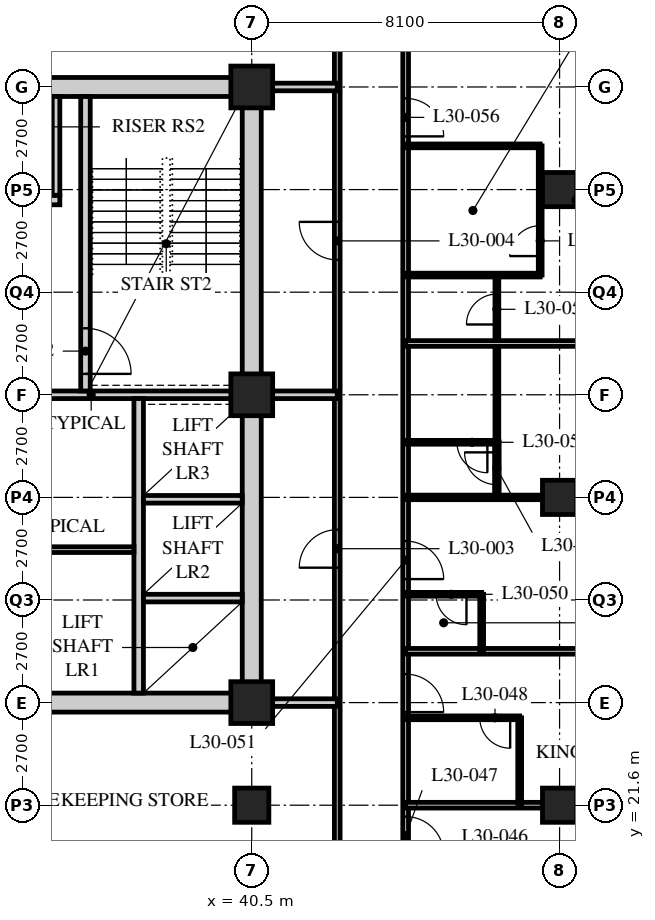
"""IFC4 building model, lengths in metres.
Left out: names, types, materials, properties, quantities, classifications, styles, units other than length and angle.
Written with IfcOpenShell. Run it as: python <this file> out.ifc"""

import sys

from ifc_helpers import new_model, si_unit, direction, frame, frame_2d, origin, origin_2d, place, context, subcontext, project, spatial, rectangle, hollow_rectangle, extrude, element, fill, save


model = new_model("IFC4")
c1 = context("Model", 3, precision=1e-05, world=origin(), true_north=direction((0.0, 1.0)))
c2 = subcontext(c1, "Body", "Model", "MODEL_VIEW")
j1 = project(units=[si_unit("LENGTHUNIT", "METRE"), si_unit("PLANEANGLEUNIT", "RADIAN")], contexts=[c1])
p1 = place(None, origin())
s1 = spatial("IfcSite", under=j1, at=p1, CompositionType="ELEMENT")
p2 = place(p1, origin())
s2 = spatial("IfcBuilding", under=s1, at=p2, CompositionType="ELEMENT")
p3 = place(p2, frame((0.0, 0.0, 120.4)))
s3 = spatial("IfcBuildingStorey", under=s2, at=p3, CompositionType="ELEMENT", Elevation=120.4)
p4 = place(p3, frame((40.5, 21.6, 0.0), z_axis=(0.0, 0.0, 1.0), x_axis=(1.0, 0.0, 0.0)))
e1 = element("IfcColumn", 1, at=p4, inside=s3, PredefinedType="COLUMN", context=c2, shape_type="SweptSolid", body=[
    extrude(hollow_rectangle(XDim=0.9, YDim=0.9, WallThickness=0.09, at=origin_2d()), origin(), (0.0, 0.0, 1.0), 3.4),
])
for number, where, z_axis, x_axis in (
    (2, (40.5, 24.3, 0.0), (0.0, 0.0, 1.0), (1.0, 0.0, 0.0)),
    (3, (40.5, 32.4, 0.0), (0.0, 0.0, 1.0), (1.0, 0.0, 0.0)),
    (4, (40.5, 40.5, 0.0), (0.0, 0.0, 1.0), (1.0, 0.0, 0.0)),
):
    element("IfcColumn", number, at=place(p3, frame(where, z_axis=z_axis, x_axis=x_axis)), inside=s3, PredefinedType="COLUMN", context=c2, shape_type="SweptSolid", body=[
        extrude(hollow_rectangle(XDim=1.1, YDim=1.1, WallThickness=0.1, at=origin_2d()), origin(), (0.0, 0.0, 1.0), 3.4),
    ])
for number, where, z_axis, x_axis in (
    (5, (48.6, 21.6, 0.0), (0.0, 0.0, 1.0), (1.0, 0.0, 0.0)),
    (6, (48.6, 29.7, 0.0), (0.0, 0.0, 1.0), (1.0, 0.0, 0.0)),
    (7, (48.6, 37.8, 0.0), (0.0, 0.0, 1.0), (1.0, 0.0, 0.0)),
):
    element("IfcColumn", number, at=place(p3, frame(where, z_axis=z_axis, x_axis=x_axis)), inside=s3, PredefinedType="COLUMN", context=c2, shape_type="SweptSolid", body=[
        extrude(hollow_rectangle(XDim=0.9, YDim=0.9, WallThickness=0.09, at=origin_2d()), origin(), (0.0, 0.0, 1.0), 3.4),
    ])
p5 = place(p3, frame((44.55, 17.55, 0.0), z_axis=(0.0, 0.0, 1.0), x_axis=(0.0, 1.0, 0.0)))
e8 = element("IfcWall", 8, at=p5, inside=s3, PredefinedType="PARTITIONING", context=c2, shape_type="SweptSolid", body=[
    extrude(rectangle(XDim=28.35, YDim=0.15, at=frame_2d((14.175, 0.0))), origin(), (0.0, 0.0, 1.0), 3.19),
])
p6 = place(p5, frame((2.75, 0.0, 0.0)))
e9 = element("IfcOpeningElement", 9, at=p6, cuts=e8, PredefinedType="OPENING", context=c2, shape_type="SweptSolid", body=[
    extrude(rectangle(XDim=1.0, YDim=2.1, at=frame_2d((0.5, 1.05))), frame((0.0, 0.085, 0.0), z_axis=(0.0, -1.0, 0.0), x_axis=(1.0, 0.0, 0.0)), (0.0, 0.0, 1.0), 0.17),
])
p7 = place(p5, frame((6.5, 0.0, 0.0)))
e10 = element("IfcOpeningElement", 10, at=p7, cuts=e8, PredefinedType="OPENING", context=c2, shape_type="SweptSolid", body=[
    extrude(rectangle(XDim=1.0, YDim=2.1, at=frame_2d((0.5, 1.05))), frame((0.0, 0.085, 0.0), z_axis=(0.0, -1.0, 0.0), x_axis=(1.0, 0.0, 0.0)), (0.0, 0.0, 1.0), 0.17),
])
p8 = place(p5, frame((10.0, 0.0, 0.0)))
e11 = element("IfcOpeningElement", 11, at=p8, cuts=e8, PredefinedType="OPENING", context=c2, shape_type="SweptSolid", body=[
    extrude(rectangle(XDim=1.0, YDim=2.1, at=frame_2d((0.5, 1.05))), frame((0.0, 0.085, 0.0), z_axis=(0.0, -1.0, 0.0), x_axis=(1.0, 0.0, 0.0)), (0.0, 0.0, 1.0), 0.17),
])
p9 = place(p5, frame((21.65, 0.0, 0.0)))
e12 = element("IfcOpeningElement", 12, at=p9, cuts=e8, PredefinedType="OPENING", context=c2, shape_type="SweptSolid", body=[
    extrude(rectangle(XDim=1.0, YDim=2.1, at=frame_2d((0.5, 1.05))), frame((0.0, 0.085, 0.0), z_axis=(0.0, -1.0, 0.0), x_axis=(1.0, 0.0, 0.0)), (0.0, 0.0, 1.0), 0.17),
])
p10 = place(p5, frame((26.75, 0.0, 0.0)))
e13 = element("IfcOpeningElement", 13, at=p10, cuts=e8, PredefinedType="OPENING", context=c2, shape_type="SweptSolid", body=[
    extrude(rectangle(XDim=1.0, YDim=2.1, at=frame_2d((0.5, 1.05))), frame((0.0, 0.085, 0.0), z_axis=(0.0, -1.0, 0.0), x_axis=(1.0, 0.0, 0.0)), (0.0, 0.0, 1.0), 0.17),
])
p11 = place(p3, frame((42.75, 19.35, 0.0), z_axis=(0.0, 0.0, 1.0), x_axis=(0.0, 1.0, 0.0)))
e14 = element("IfcWall", 14, at=p11, inside=s3, PredefinedType="PARTITIONING", context=c2, shape_type="SweptSolid", body=[
    extrude(rectangle(XDim=24.75, YDim=0.15, at=frame_2d((12.375, 0.0))), origin(), (0.0, 0.0, 1.0), 3.19),
])
p12 = place(p11, frame((8.5, 0.0, 0.0)))
e15 = element("IfcOpeningElement", 15, at=p12, cuts=e14, PredefinedType="OPENING", context=c2, shape_type="SweptSolid", body=[
    extrude(rectangle(XDim=1.0, YDim=2.1, at=frame_2d((0.5, 1.05))), frame((0.0, 0.085, 0.0), z_axis=(0.0, -1.0, 0.0), x_axis=(1.0, 0.0, 0.0)), (0.0, 0.0, 1.0), 0.17),
])
p13 = place(p11, frame((16.6, 0.0, 0.0)))
e16 = element("IfcOpeningElement", 16, at=p13, cuts=e14, PredefinedType="OPENING", context=c2, shape_type="SweptSolid", body=[
    extrude(rectangle(XDim=1.0, YDim=2.1, at=frame_2d((0.5, 1.05))), frame((0.0, 0.085, 0.0), z_axis=(0.0, -1.0, 0.0), x_axis=(1.0, 0.0, 0.0)), (0.0, 0.0, 1.0), 0.17),
])
for number, where, z_axis, x_axis in (
    (17, (40.5, 32.4, 0.0), (0.0, 0.0, 1.0), (1.0, 0.0, 0.0)),
    (18, (40.5, 24.3, 0.0), (0.0, 0.0, 1.0), (1.0, 0.0, 0.0)),
    (19, (40.5, 40.5, 0.0), (0.0, 0.0, 1.0), (1.0, 0.0, 0.0)),
):
    element("IfcWall", number, at=place(p3, frame(where, z_axis=z_axis, x_axis=x_axis)), inside=s3, PredefinedType="SOLIDWALL", context=c2, shape_type="SweptSolid", body=[
        extrude(rectangle(XDim=2.25, YDim=0.2, at=frame_2d((1.125, 0.0))), origin(), (0.0, 0.0, 1.0), 3.19),
    ])
p14 = place(p3, frame((44.55, 21.6, 0.0), z_axis=(0.0, 0.0, 1.0), x_axis=(1.0, 0.0, 0.0)))
e20 = element("IfcWall", 20, at=p14, inside=s3, PredefinedType="PARTITIONING", context=c2, shape_type="SweptSolid", body=[
    extrude(rectangle(XDim=11.85, YDim=0.15, at=frame_2d((5.925, 0.0))), origin(), (0.0, 0.0, 1.0), 2.578),
])
p15 = place(p3, frame((47.55, 21.6, 0.0), z_axis=(0.0, 0.0, 1.0), x_axis=(0.0, 1.0, 0.0)))
e21 = element("IfcWall", 21, at=p15, inside=s3, PredefinedType="PARTITIONING", context=c2, shape_type="SweptSolid", body=[
    extrude(rectangle(XDim=2.3, YDim=0.1, at=frame_2d((1.15, 0.0))), origin(), (0.0, 0.0, 1.0), 3.19),
])
p16 = place(p3, frame((44.55, 23.9, 0.0), z_axis=(0.0, 0.0, 1.0), x_axis=(1.0, 0.0, 0.0)))
e22 = element("IfcWall", 22, at=p16, inside=s3, PredefinedType="PARTITIONING", context=c2, shape_type="SweptSolid", body=[
    extrude(rectangle(XDim=3.0, YDim=0.1, at=frame_2d((1.5, 0.0))), origin(), (0.0, 0.0, 1.0), 3.19),
])
p17 = place(p16, frame((1.95, 0.0, 0.0)))
e23 = element("IfcOpeningElement", 23, at=p17, cuts=e22, PredefinedType="OPENING", context=c2, shape_type="SweptSolid", body=[
    extrude(rectangle(XDim=0.8, YDim=2.1, at=frame_2d((0.4, 1.05))), frame((0.0, 0.06, 0.0), z_axis=(0.0, -1.0, 0.0), x_axis=(1.0, 0.0, 0.0)), (0.0, 0.0, 1.0), 0.12),
])
p18 = place(p3, frame((44.55, 25.65, 0.0), z_axis=(0.0, 0.0, 1.0), x_axis=(1.0, 0.0, 0.0)))
e24 = element("IfcWall", 24, at=p18, inside=s3, PredefinedType="PARTITIONING", context=c2, shape_type="SweptSolid", body=[
    extrude(rectangle(XDim=11.85, YDim=0.15, at=frame_2d((5.925, 0.0))), origin(), (0.0, 0.0, 1.0), 3.19),
])
p19 = place(p3, frame((46.55, 25.65, 0.0), z_axis=(0.0, 0.0, 1.0), x_axis=(0.0, 1.0, 0.0)))
e25 = element("IfcWall", 25, at=p19, inside=s3, PredefinedType="PARTITIONING", context=c2, shape_type="SweptSolid", body=[
    extrude(rectangle(XDim=1.5, YDim=0.1, at=frame_2d((0.75, 0.0))), origin(), (0.0, 0.0, 1.0), 3.19),
])
p20 = place(p3, frame((44.55, 27.15, 0.0), z_axis=(0.0, 0.0, 1.0), x_axis=(1.0, 0.0, 0.0)))
e26 = element("IfcWall", 26, at=p20, inside=s3, PredefinedType="PARTITIONING", context=c2, shape_type="SweptSolid", body=[
    extrude(rectangle(XDim=2.0, YDim=0.1, at=frame_2d((1.0, 0.0))), origin(), (0.0, 0.0, 1.0), 3.19),
])
p21 = place(p20, frame((0.8, 0.0, 0.0)))
e27 = element("IfcOpeningElement", 27, at=p21, cuts=e26, PredefinedType="OPENING", context=c2, shape_type="SweptSolid", body=[
    extrude(rectangle(XDim=0.8, YDim=2.1, at=frame_2d((0.4, 1.05))), frame((0.0, 0.06, 0.0), z_axis=(0.0, -1.0, 0.0), x_axis=(1.0, 0.0, 0.0)), (0.0, 0.0, 1.0), 0.12),
])
p22 = place(p3, frame((46.95, 31.15, 0.0), z_axis=(0.0, 0.0, 1.0), x_axis=(0.0, 1.0, 0.0)))
e28 = element("IfcWall", 28, at=p22, inside=s3, PredefinedType="PARTITIONING", context=c2, shape_type="SweptSolid", body=[
    extrude(rectangle(XDim=4.4, YDim=0.1, at=frame_2d((2.2, 0.0))), origin(), (0.0, 0.0, 1.0), 3.19),
])
p23 = place(p22, frame((3.1, 0.0, 0.0)))
e29 = element("IfcOpeningElement", 29, at=p23, cuts=e28, PredefinedType="OPENING", context=c2, shape_type="SweptSolid", body=[
    extrude(rectangle(XDim=0.8, YDim=2.1, at=frame_2d((0.4, 1.05))), frame((0.0, 0.06, 0.0), z_axis=(0.0, -1.0, 0.0), x_axis=(1.0, 0.0, 0.0)), (0.0, 0.0, 1.0), 0.12),
])
p24 = place(p3, frame((44.55, 31.15, 0.0), z_axis=(0.0, 0.0, 1.0), x_axis=(1.0, 0.0, 0.0)))
e30 = element("IfcWall", 30, at=p24, inside=s3, PredefinedType="PARTITIONING", context=c2, shape_type="SweptSolid", body=[
    extrude(rectangle(XDim=2.4, YDim=0.1, at=frame_2d((1.2, 0.0))), origin(), (0.0, 0.0, 1.0), 3.19),
])
p25 = place(p24, frame((1.35, 0.0, 0.0)))
e31 = element("IfcOpeningElement", 31, at=p25, cuts=e30, PredefinedType="OPENING", context=c2, shape_type="SweptSolid", body=[
    extrude(rectangle(XDim=0.8, YDim=2.1, at=frame_2d((0.4, 1.05))), frame((0.0, 0.06, 0.0), z_axis=(0.0, -1.0, 0.0), x_axis=(1.0, 0.0, 0.0)), (0.0, 0.0, 1.0), 0.12),
])
p26 = place(p3, frame((44.55, 29.7, 0.0), z_axis=(0.0, 0.0, 1.0), x_axis=(1.0, 0.0, 0.0)))
e32 = element("IfcWall", 32, at=p26, inside=s3, PredefinedType="PARTITIONING", context=c2, shape_type="SweptSolid", body=[
    extrude(rectangle(XDim=11.85, YDim=0.12, at=frame_2d((5.925, 0.0))), origin(), (0.0, 0.0, 1.0), 2.578),
])
p27 = place(p26, frame((6.85, 0.0, 0.0)))
e33 = element("IfcOpeningElement", 33, at=p27, cuts=e32, PredefinedType="OPENING", context=c2, shape_type="SweptSolid", body=[
    extrude(rectangle(XDim=0.85, YDim=2.1, at=frame_2d((0.425, 1.05))), frame((0.0, 0.07, 0.0), z_axis=(0.0, -1.0, 0.0), x_axis=(1.0, 0.0, 0.0)), (0.0, 0.0, 1.0), 0.14),
])
p28 = place(p3, frame((44.55, 33.75, 0.0), z_axis=(0.0, 0.0, 1.0), x_axis=(1.0, 0.0, 0.0)))
e34 = element("IfcWall", 34, at=p28, inside=s3, PredefinedType="PARTITIONING", context=c2, shape_type="SweptSolid", body=[
    extrude(rectangle(XDim=11.85, YDim=0.15, at=frame_2d((5.925, 0.0))), origin(), (0.0, 0.0, 1.0), 3.19),
])
p29 = place(p3, frame((48.09, 35.55, 0.0), z_axis=(0.0, 0.0, 1.0), x_axis=(0.0, 1.0, 0.0)))
e35 = element("IfcWall", 35, at=p29, inside=s3, PredefinedType="PARTITIONING", context=c2, shape_type="SweptSolid", body=[
    extrude(rectangle(XDim=3.4, YDim=0.1, at=frame_2d((1.7, 0.0))), origin(), (0.0, 0.0, 1.0), 3.19),
])
p30 = place(p29, frame((0.5, 0.0, 0.0)))
e36 = element("IfcOpeningElement", 36, at=p30, cuts=e35, PredefinedType="OPENING", context=c2, shape_type="SweptSolid", body=[
    extrude(rectangle(XDim=0.8, YDim=2.1, at=frame_2d((0.4, 1.05))), frame((0.0, 0.06, 0.0), z_axis=(0.0, -1.0, 0.0), x_axis=(1.0, 0.0, 0.0)), (0.0, 0.0, 1.0), 0.12),
])
for number, where, z_axis, x_axis in (
    (37, (44.55, 35.55, 0.0), (0.0, 0.0, 1.0), (1.0, 0.0, 0.0)),
    (38, (44.55, 38.95, 0.0), (0.0, 0.0, 1.0), (1.0, 0.0, 0.0)),
):
    element("IfcWall", number, at=place(p3, frame(where, z_axis=z_axis, x_axis=x_axis)), inside=s3, PredefinedType="PARTITIONING", context=c2, shape_type="SweptSolid", body=[
        extrude(rectangle(XDim=3.54, YDim=0.1, at=frame_2d((1.77, 0.0))), origin(), (0.0, 0.0, 1.0), 3.19),
    ])
p31 = place(p3, frame((46.95, 31.16, 0.0), z_axis=(0.0, 0.0, 1.0), x_axis=(0.0, -1.0, 0.0)))
e39 = element("IfcWall", 39, at=p31, inside=s3, PredefinedType="PARTITIONING", context=c2, shape_type="SweptSolid", body=[
    extrude(rectangle(XDim=1.46, YDim=0.12, at=frame_2d((0.73, 0.0))), origin(), (0.0, 0.0, 1.0), 3.19),
])
p32 = place(p31, frame((0.275, 0.0, 0.0)))
e40 = element("IfcOpeningElement", 40, at=p32, cuts=e39, PredefinedType="OPENING", context=c2, shape_type="SweptSolid", body=[
    extrude(rectangle(XDim=0.85, YDim=2.1, at=frame_2d((0.425, 1.05))), frame((0.0, 0.07, 0.0), z_axis=(0.0, -1.0, 0.0), x_axis=(1.0, 0.0, 0.0)), (0.0, 0.0, 1.0), 0.14),
])
p33 = place(p3, frame((15.95, 24.3, 0.0), z_axis=(0.0, 0.0, 1.0), x_axis=(1.0, 0.0, 0.0)))
e41 = element("IfcWall", 41, at=p33, inside=s3, PredefinedType="SOLIDWALL", context=c2, shape_type="SweptSolid", body=[
    extrude(rectangle(XDim=24.8, YDim=0.5, at=frame_2d((12.4, 0.0))), origin(), (0.0, 0.0, 1.0), 2.54),
])
p34 = place(p33, frame((11.5, 0.0, 0.0)))
e42 = element("IfcOpeningElement", 42, at=p34, cuts=e41, PredefinedType="OPENING", context=c2, shape_type="SweptSolid", body=[
    extrude(rectangle(XDim=1.8, YDim=2.4, at=frame_2d((0.9, 1.2))), frame((0.0, 0.26, 0.0), z_axis=(0.0, -1.0, 0.0), x_axis=(1.0, 0.0, 0.0)), (0.0, 0.0, 1.0), 0.52),
])
p35 = place(p3, frame((15.95, 40.5, 0.0), z_axis=(0.0, 0.0, 1.0), x_axis=(1.0, 0.0, 0.0)))
e43 = element("IfcWall", 43, at=p35, inside=s3, PredefinedType="SOLIDWALL", context=c2, shape_type="SweptSolid", body=[
    extrude(rectangle(XDim=24.8, YDim=0.5, at=frame_2d((12.4, 0.0))), origin(), (0.0, 0.0, 1.0), 2.54),
])
p36 = place(p35, frame((11.5, 0.0, 0.0)))
e44 = element("IfcOpeningElement", 44, at=p36, cuts=e43, PredefinedType="OPENING", context=c2, shape_type="SweptSolid", body=[
    extrude(rectangle(XDim=1.8, YDim=2.4, at=frame_2d((0.9, 1.2))), frame((0.0, 0.26, 0.0), z_axis=(0.0, -1.0, 0.0), x_axis=(1.0, 0.0, 0.0)), (0.0, 0.0, 1.0), 0.52),
])
p37 = place(p3, frame((40.5, 24.55, 0.0), z_axis=(0.0, 0.0, 1.0), x_axis=(0.0, 1.0, 0.0)))
e45 = element("IfcWall", 45, at=p37, inside=s3, PredefinedType="SOLIDWALL", context=c2, shape_type="SweptSolid", body=[
    extrude(rectangle(XDim=15.7, YDim=0.5, at=frame_2d((7.85, 0.0))), origin(), (0.0, 0.0, 1.0), 2.578),
])
p38 = place(p3, frame((32.3, 32.4, 0.0), z_axis=(0.0, 0.0, 1.0), x_axis=(1.0, 0.0, 0.0)))
e46 = element("IfcWall", 46, at=p38, inside=s3, PredefinedType="SOLIDWALL", context=c2, shape_type="SweptSolid", body=[
    extrude(rectangle(XDim=7.95, YDim=0.2, at=frame_2d((3.975, 0.0))), origin(), (0.0, 0.0, 1.0), 2.578),
])
p39 = place(p3, frame((37.525, 24.55, 0.0), z_axis=(0.0, 0.0, 1.0), x_axis=(0.0, 1.0, 0.0)))
e47 = element("IfcWall", 47, at=p39, inside=s3, PredefinedType="SOLIDWALL", context=c2, shape_type="SweptSolid", body=[
    extrude(rectangle(XDim=7.75, YDim=0.25, at=frame_2d((3.875, 0.0))), origin(), (0.0, 0.0, 1.0), 3.19),
])
for number, where, z_axis, x_axis in (
    (48, (37.65, 27.05, 0.0), (0.0, 0.0, 1.0), (1.0, 0.0, 0.0)),
    (49, (37.65, 29.65, 0.0), (0.0, 0.0, 1.0), (1.0, 0.0, 0.0)),
):
    element("IfcWall", number, at=place(p3, frame(where, z_axis=z_axis, x_axis=x_axis)), inside=s3, PredefinedType="SOLIDWALL", context=c2, shape_type="SweptSolid", body=[
        extrude(rectangle(XDim=2.6, YDim=0.2, at=frame_2d((1.3, 0.0))), origin(), (0.0, 0.0, 1.0), 3.19),
    ])
p40 = place(p3, frame((36.125, 32.5, 0.0), z_axis=(0.0, 0.0, 1.0), x_axis=(0.0, 1.0, 0.0)))
e50 = element("IfcWall", 50, at=p40, inside=s3, PredefinedType="SOLIDWALL", context=c2, shape_type="SweptSolid", body=[
    extrude(rectangle(XDim=7.75, YDim=0.25, at=frame_2d((3.875, 0.0))), origin(), (0.0, 0.0, 1.0), 3.19),
])
p41 = place(p40, frame((0.45, 0.0, 0.0)))
e51 = element("IfcOpeningElement", 51, at=p41, cuts=e50, PredefinedType="OPENING", context=c2, shape_type="SweptSolid", body=[
    extrude(rectangle(XDim=1.2, YDim=2.1, at=frame_2d((0.6, 1.05))), frame((0.0, 0.135, 0.0), z_axis=(0.0, -1.0, 0.0), x_axis=(1.0, 0.0, 0.0)), (0.0, 0.0, 1.0), 0.27),
])
p42 = place(p3, frame((32.5, 37.525, 0.0), z_axis=(0.0, 0.0, 1.0), x_axis=(1.0, 0.0, 0.0)))
e52 = element("IfcWall", 52, at=p42, inside=s3, PredefinedType="SOLIDWALL", context=c2, shape_type="SweptSolid", body=[
    extrude(rectangle(XDim=2.95, YDim=0.25, at=frame_2d((1.475, 0.0))), origin(), (0.0, 0.0, 1.0), 3.19),
])
p43 = place(p42, frame((0.9, 0.0, 0.0)))
e53 = element("IfcOpeningElement", 53, at=p43, cuts=e52, PredefinedType="OPENING", context=c2, shape_type="SweptSolid", body=[
    extrude(rectangle(XDim=1.1, YDim=2.4, at=frame_2d((0.55, 1.2))), frame((0.0, 0.135, 0.0), z_axis=(0.0, -1.0, 0.0), x_axis=(1.0, 0.0, 0.0)), (0.0, 0.0, 1.0), 0.27),
])
p44 = place(p3, frame((35.35, 37.65, 0.0), z_axis=(0.0, 0.0, 1.0), x_axis=(0.0, 1.0, 0.0)))
e54 = element("IfcWall", 54, at=p44, inside=s3, PredefinedType="SOLIDWALL", context=c2, shape_type="SweptSolid", body=[
    extrude(rectangle(XDim=2.6, YDim=0.2, at=frame_2d((1.3, 0.0))), origin(), (0.0, 0.0, 1.0), 3.19),
])
p45 = place(p3, frame((32.5, 28.325, 0.0), z_axis=(0.0, 0.0, 1.0), x_axis=(1.0, 0.0, 0.0)))
e55 = element("IfcWall", 55, at=p45, inside=s3, PredefinedType="PARTITIONING", context=c2, shape_type="SweptSolid", body=[
    extrude(rectangle(XDim=4.9, YDim=0.15, at=frame_2d((2.45, 0.0))), origin(), (0.0, 0.0, 1.0), 3.19),
])
p46 = place(p12, origin())
e56 = element("IfcDoor", 56, at=p46, inside=s3, OperationType="SINGLE_SWING_LEFT", PredefinedType="DOOR", context=c2, shape_type="SweptSolid", body=[
    extrude(rectangle(XDim=1.0, YDim=2.1, at=frame_2d((0.5, 1.05))), frame((0.0, 0.025, 0.0), z_axis=(0.0, -1.0, 0.0), x_axis=(1.0, 0.0, 0.0)), (0.0, 0.0, 1.0), 0.05),
])
fill(e15, e56)
p47 = place(p13, origin())
e57 = element("IfcDoor", 57, at=p47, inside=s3, OperationType="SINGLE_SWING_RIGHT", PredefinedType="DOOR", context=c2, shape_type="SweptSolid", body=[
    extrude(rectangle(XDim=1.0, YDim=2.1, at=frame_2d((0.5, 1.05))), frame((0.0, 0.025, 0.0), z_axis=(0.0, -1.0, 0.0), x_axis=(1.0, 0.0, 0.0)), (0.0, 0.0, 1.0), 0.05),
])
fill(e16, e57)
p48 = place(p6, origin())
e58 = element("IfcDoor", 58, at=p48, inside=s3, OperationType="SINGLE_SWING_RIGHT", PredefinedType="DOOR", context=c2, shape_type="SweptSolid", body=[
    extrude(rectangle(XDim=1.0, YDim=2.1, at=frame_2d((0.5, 1.05))), frame((0.0, 0.025, 0.0), z_axis=(0.0, -1.0, 0.0), x_axis=(1.0, 0.0, 0.0)), (0.0, 0.0, 1.0), 0.05),
])
fill(e9, e58)
p49 = place(p17, origin())
e59 = element("IfcDoor", 59, at=p49, inside=s3, OperationType="SINGLE_SWING_LEFT", PredefinedType="DOOR", context=c2, shape_type="SweptSolid", body=[
    extrude(rectangle(XDim=0.8, YDim=2.1, at=frame_2d((0.4, 1.05))), frame((0.0, 0.025, 0.0), z_axis=(0.0, -1.0, 0.0), x_axis=(1.0, 0.0, 0.0)), (0.0, 0.0, 1.0), 0.05),
])
fill(e23, e59)
p50 = place(p7, origin())
e60 = element("IfcDoor", 60, at=p50, inside=s3, OperationType="SINGLE_SWING_RIGHT", PredefinedType="DOOR", context=c2, shape_type="SweptSolid", body=[
    extrude(rectangle(XDim=1.0, YDim=2.1, at=frame_2d((0.5, 1.05))), frame((0.0, 0.025, 0.0), z_axis=(0.0, -1.0, 0.0), x_axis=(1.0, 0.0, 0.0)), (0.0, 0.0, 1.0), 0.05),
])
fill(e10, e60)
p51 = place(p21, origin())
e61 = element("IfcDoor", 61, at=p51, inside=s3, OperationType="SINGLE_SWING_LEFT", PredefinedType="DOOR", context=c2, shape_type="SweptSolid", body=[
    extrude(rectangle(XDim=0.8, YDim=2.1, at=frame_2d((0.4, 1.05))), frame((0.0, 0.025, 0.0), z_axis=(0.0, -1.0, 0.0), x_axis=(1.0, 0.0, 0.0)), (0.0, 0.0, 1.0), 0.05),
])
fill(e27, e61)
p52 = place(p8, origin())
e62 = element("IfcDoor", 62, at=p52, inside=s3, OperationType="SINGLE_SWING_RIGHT", PredefinedType="DOOR", context=c2, shape_type="SweptSolid", body=[
    extrude(rectangle(XDim=1.0, YDim=2.1, at=frame_2d((0.5, 1.05))), frame((0.0, 0.025, 0.0), z_axis=(0.0, -1.0, 0.0), x_axis=(1.0, 0.0, 0.0)), (0.0, 0.0, 1.0), 0.05),
])
fill(e11, e62)
p53 = place(p25, origin())
e63 = element("IfcDoor", 63, at=p53, inside=s3, OperationType="SINGLE_SWING_LEFT", PredefinedType="DOOR", context=c2, shape_type="SweptSolid", body=[
    extrude(rectangle(XDim=0.8, YDim=2.1, at=frame_2d((0.4, 1.05))), frame((0.0, 0.025, 0.0), z_axis=(0.0, -1.0, 0.0), x_axis=(1.0, 0.0, 0.0)), (0.0, 0.0, 1.0), 0.05),
])
fill(e31, e63)
p54 = place(p30, origin())
e64 = element("IfcDoor", 64, at=p54, inside=s3, OperationType="SINGLE_SWING_LEFT", PredefinedType="DOOR", context=c2, shape_type="SweptSolid", body=[
    extrude(rectangle(XDim=0.8, YDim=2.1, at=frame_2d((0.4, 1.05))), frame((0.0, 0.025, 0.0), z_axis=(0.0, -1.0, 0.0), x_axis=(1.0, 0.0, 0.0)), (0.0, 0.0, 1.0), 0.05),
])
fill(e36, e64)
p55 = place(p23, origin())
e65 = element("IfcDoor", 65, at=p55, inside=s3, OperationType="SINGLE_SWING_LEFT", PredefinedType="DOOR", context=c2, shape_type="SweptSolid", body=[
    extrude(rectangle(XDim=0.8, YDim=2.1, at=frame_2d((0.4, 1.05))), frame((0.0, 0.025, 0.0), z_axis=(0.0, -1.0, 0.0), x_axis=(1.0, 0.0, 0.0)), (0.0, 0.0, 1.0), 0.05),
])
fill(e29, e65)
p56 = place(p9, origin())
e66 = element("IfcDoor", 66, at=p56, inside=s3, OperationType="SINGLE_SWING_RIGHT", PredefinedType="DOOR", context=c2, shape_type="SweptSolid", body=[
    extrude(rectangle(XDim=1.0, YDim=2.1, at=frame_2d((0.5, 1.05))), frame((0.0, 0.025, 0.0), z_axis=(0.0, -1.0, 0.0), x_axis=(1.0, 0.0, 0.0)), (0.0, 0.0, 1.0), 0.05),
])
fill(e12, e66)
p57 = place(p32, origin())
e67 = element("IfcDoor", 67, at=p57, inside=s3, OperationType="SINGLE_SWING_RIGHT", PredefinedType="DOOR", context=c2, shape_type="SweptSolid", body=[
    extrude(rectangle(XDim=0.85, YDim=2.1, at=frame_2d((0.425, 1.05))), frame((0.0, 0.025, 0.0), z_axis=(0.0, -1.0, 0.0), x_axis=(1.0, 0.0, 0.0)), (0.0, 0.0, 1.0), 0.05),
])
fill(e40, e67)
p58 = place(p41, origin())
e68 = element("IfcDoor", 68, at=p58, inside=s3, OperationType="SINGLE_SWING_RIGHT", PredefinedType="DOOR", context=c2, shape_type="SweptSolid", body=[
    extrude(rectangle(XDim=1.2, YDim=2.1, at=frame_2d((0.6, 1.05))), frame((0.0, 0.025, 0.0), z_axis=(0.0, -1.0, 0.0), x_axis=(1.0, 0.0, 0.0)), (0.0, 0.0, 1.0), 0.05),
])
fill(e51, e68)
save(model, sys.argv[1])
